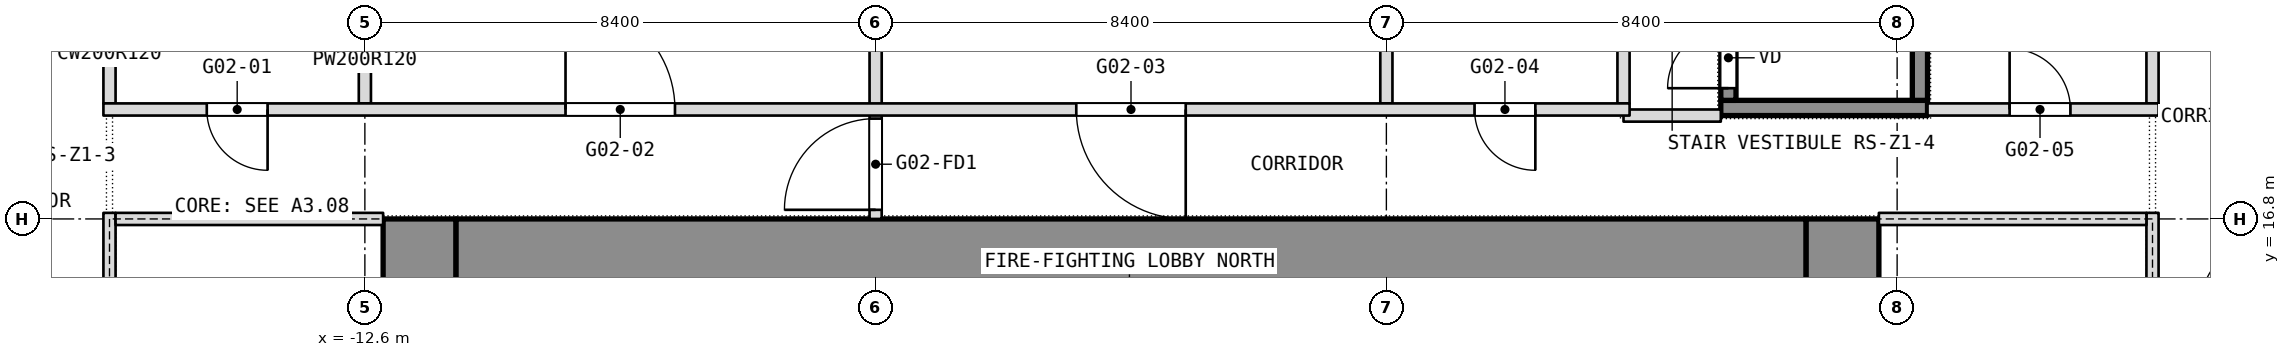
"""IFC4 building model, lengths in metres.
Left out: names, types, materials, properties, quantities, classifications, styles, units other than length and angle.
Written with IfcOpenShell. Run it as: python <this file> out.ifc"""

import sys

from ifc_helpers import new_model, si_unit, direction, frame, frame_2d, origin, place, context, subcontext, project, spatial, rectangle, extrude, element, fill, save


model = new_model("IFC4")
c1 = context("Model", 3, precision=1e-05, world=origin(), true_north=direction((0.0, 1.0)))
c2 = subcontext(c1, "Body", "Model", "MODEL_VIEW")
j1 = project(units=[si_unit("LENGTHUNIT", "METRE"), si_unit("PLANEANGLEUNIT", "RADIAN")], contexts=[c1])
p1 = place(None, origin())
s1 = spatial("IfcSite", under=j1, at=p1, CompositionType="ELEMENT")
p2 = place(p1, origin())
s2 = spatial("IfcBuilding", under=s1, at=p2, CompositionType="ELEMENT")
p3 = place(p2, frame((0.0, 0.0, 43.7)))
s3 = spatial("IfcBuildingStorey", under=s2, at=p3, CompositionType="ELEMENT", Elevation=43.7)
p4 = place(p3, frame((11.7, 0.0, 0.0), z_axis=(0.0, 0.0, 1.0), x_axis=(0.0, 1.0, 0.0)))
e1 = element("IfcWall", 1, at=p4, inside=s3, PredefinedType="SHEAR", context=c2, shape_type="SweptSolid", body=[
    extrude(rectangle(XDim=16.8, YDim=1.2, at=frame_2d((8.4, 0.0))), origin(), (0.0, 0.0, 1.0), 3.6),
])
p5 = place(p4, frame((1.837, 0.0, 0.0)))
e2 = element("IfcOpeningElement", 2, at=p5, cuts=e1, PredefinedType="OPENING", context=c2, shape_type="SweptSolid", body=[
    extrude(rectangle(XDim=0.9, YDim=2.1, at=frame_2d((0.45, 1.05))), frame((0.0, 0.6, 0.0), z_axis=(0.0, -1.0, 0.0), x_axis=(1.0, 0.0, 0.0)), (0.0, 0.0, 1.0), 1.2),
])
p6 = place(p4, frame((4.462, 0.0, 0.0)))
e3 = element("IfcOpeningElement", 3, at=p6, cuts=e1, PredefinedType="OPENING", context=c2, shape_type="SweptSolid", body=[
    extrude(rectangle(XDim=0.9, YDim=2.1, at=frame_2d((0.45, 1.05))), frame((0.0, 0.6, 0.0), z_axis=(0.0, -1.0, 0.0), x_axis=(1.0, 0.0, 0.0)), (0.0, 0.0, 1.0), 1.2),
])
p7 = place(p4, frame((6.825, 0.0, 0.0)))
e4 = element("IfcOpeningElement", 4, at=p7, cuts=e1, PredefinedType="OPENING", context=c2, shape_type="SweptSolid", body=[
    extrude(rectangle(XDim=1.2, YDim=2.1, at=frame_2d((0.6, 1.05))), frame((0.0, 0.6, 0.0), z_axis=(0.0, -1.0, 0.0), x_axis=(1.0, 0.0, 0.0)), (0.0, 0.0, 1.0), 1.2),
])
p8 = place(p4, frame((12.3, 0.0, 0.0)))
e5 = element("IfcOpeningElement", 5, at=p8, cuts=e1, PredefinedType="OPENING", context=c2, shape_type="SweptSolid", body=[
    extrude(rectangle(XDim=0.9, YDim=2.1, at=frame_2d((0.45, 1.05))), frame((0.0, 0.6, 0.0), z_axis=(0.0, -1.0, 0.0), x_axis=(1.0, 0.0, 0.0)), (0.0, 0.0, 1.0), 1.2),
])
p9 = place(p4, frame((8.775, 0.0, 0.0)))
e6 = element("IfcOpeningElement", 6, at=p9, cuts=e1, PredefinedType="OPENING", context=c2, shape_type="SweptSolid", body=[
    extrude(rectangle(XDim=1.2, YDim=2.1, at=frame_2d((0.6, 1.05))), frame((0.0, 0.6, 0.0), z_axis=(0.0, -1.0, 0.0), x_axis=(1.0, 0.0, 0.0)), (0.0, 0.0, 1.0), 1.2),
])
p10 = place(p3, frame((-11.7, 0.0, 0.0), z_axis=(0.0, 0.0, 1.0), x_axis=(0.0, 1.0, 0.0)))
e7 = element("IfcWall", 7, at=p10, inside=s3, PredefinedType="SHEAR", context=c2, shape_type="SweptSolid", body=[
    extrude(rectangle(XDim=16.8, YDim=1.2, at=frame_2d((8.4, 0.0))), origin(), (0.0, 0.0, 1.0), 3.6),
])
p11 = place(p10, frame((2.3, 0.0, 0.0)))
e8 = element("IfcOpeningElement", 8, at=p11, cuts=e7, PredefinedType="OPENING", context=c2, shape_type="SweptSolid", body=[
    extrude(rectangle(XDim=1.1, YDim=2.1, at=frame_2d((0.55, 1.05))), frame((0.0, 0.6, 0.0), z_axis=(0.0, -1.0, 0.0), x_axis=(1.0, 0.0, 0.0)), (0.0, 0.0, 1.0), 1.2),
])
p12 = place(p10, frame((4.85, 0.0, 0.0)))
e9 = element("IfcOpeningElement", 9, at=p12, cuts=e7, PredefinedType="OPENING", context=c2, shape_type="SweptSolid", body=[
    extrude(rectangle(XDim=1.1, YDim=2.1, at=frame_2d((0.55, 1.05))), frame((0.0, 0.6, 0.0), z_axis=(0.0, -1.0, 0.0), x_axis=(1.0, 0.0, 0.0)), (0.0, 0.0, 1.0), 1.2),
])
p13 = place(p10, frame((6.825, 0.0, 0.0)))
e10 = element("IfcOpeningElement", 10, at=p13, cuts=e7, PredefinedType="OPENING", context=c2, shape_type="SweptSolid", body=[
    extrude(rectangle(XDim=1.2, YDim=2.1, at=frame_2d((0.6, 1.05))), frame((0.0, 0.6, 0.0), z_axis=(0.0, -1.0, 0.0), x_axis=(1.0, 0.0, 0.0)), (0.0, 0.0, 1.0), 1.2),
])
p14 = place(p10, frame((13.4, 0.0, 0.0)))
e11 = element("IfcOpeningElement", 11, at=p14, cuts=e7, PredefinedType="OPENING", context=c2, shape_type="SweptSolid", body=[
    extrude(rectangle(XDim=1.1, YDim=2.1, at=frame_2d((0.55, 1.05))), frame((0.0, 0.6, 0.0), z_axis=(0.0, -1.0, 0.0), x_axis=(1.0, 0.0, 0.0)), (0.0, 0.0, 1.0), 1.2),
])
p15 = place(p10, frame((10.85, 0.0, 0.0)))
e12 = element("IfcOpeningElement", 12, at=p15, cuts=e7, PredefinedType="OPENING", context=c2, shape_type="SweptSolid", body=[
    extrude(rectangle(XDim=1.1, YDim=2.1, at=frame_2d((0.55, 1.05))), frame((0.0, 0.6, 0.0), z_axis=(0.0, -1.0, 0.0), x_axis=(1.0, 0.0, 0.0)), (0.0, 0.0, 1.0), 1.2),
])
p16 = place(p10, frame((8.775, 0.0, 0.0)))
e13 = element("IfcOpeningElement", 13, at=p16, cuts=e7, PredefinedType="OPENING", context=c2, shape_type="SweptSolid", body=[
    extrude(rectangle(XDim=1.2, YDim=2.1, at=frame_2d((0.6, 1.05))), frame((0.0, 0.6, 0.0), z_axis=(0.0, -1.0, 0.0), x_axis=(1.0, 0.0, 0.0)), (0.0, 0.0, 1.0), 1.2),
])
p17 = place(p3, frame((-11.1, 16.2, 0.0), z_axis=(0.0, 0.0, 1.0), x_axis=(1.0, 0.0, 0.0)))
e14 = element("IfcWall", 14, at=p17, inside=s3, PredefinedType="SHEAR", context=c2, shape_type="SweptSolid", body=[
    extrude(rectangle(XDim=22.2, YDim=1.2, at=frame_2d((11.1, 0.0))), origin(), (0.0, 0.0, 1.0), 3.6),
])
p18 = place(p3, frame((16.8, 18.7, 0.0), z_axis=(0.0, 0.0, 1.0), x_axis=(0.0, 1.0, 0.0)))
e15 = element("IfcWall", 15, at=p18, inside=s3, PredefinedType="PARTITIONING", context=c2, shape_type="SweptSolid", body=[
    extrude(rectangle(XDim=3.0, YDim=0.2, at=frame_2d((1.5, 0.0))), origin(), (0.0, 0.0, 1.0), 3.34),
])
for number, where, z_axis, x_axis in (
    (16, (8.1, 18.7, 0.0), (0.0, 0.0, 1.0), (0.0, 1.0, 0.0)),
    (17, (4.2, 18.7, 0.0), (0.0, 0.0, 1.0), (0.0, 1.0, 0.0)),
):
    element("IfcWall", number, at=place(p3, frame(where, z_axis=z_axis, x_axis=x_axis)), inside=s3, PredefinedType="PARTITIONING", context=c2, shape_type="SweptSolid", body=[
        extrude(rectangle(XDim=2.8, YDim=0.2, at=frame_2d((1.4, 0.0))), origin(), (0.0, 0.0, 1.0), 3.34),
    ])
p19 = place(p3, frame((-4.2, 16.8, 0.0), z_axis=(0.0, 0.0, 1.0), x_axis=(0.0, 1.0, 0.0)))
e18 = element("IfcWall", 18, at=p19, inside=s3, PredefinedType="PARTITIONING", context=c2, shape_type="SweptSolid", body=[
    extrude(rectangle(XDim=6.7, YDim=0.2, at=frame_2d((3.35, 0.0))), origin(), (0.0, 0.0, 1.0), 3.34),
])
p20 = place(p19, frame((0.15, 0.0, 0.0)))
e19 = element("IfcOpeningElement", 19, at=p20, cuts=e18, PredefinedType="OPENING", context=c2, shape_type="SweptSolid", body=[
    extrude(rectangle(XDim=1.5, YDim=2.1, at=frame_2d((0.75, 1.05))), frame((0.0, 0.1, 0.0), z_axis=(0.0, -1.0, 0.0), x_axis=(1.0, 0.0, 0.0)), (0.0, 0.0, 1.0), 0.2),
])
p21 = place(p19, frame((4.95, 0.0, 0.0)))
e20 = element("IfcOpeningElement", 20, at=p21, cuts=e18, PredefinedType="OPENING", context=c2, shape_type="SweptSolid", body=[
    extrude(rectangle(XDim=1.5, YDim=2.1, at=frame_2d((0.75, 1.05))), frame((0.0, 0.1, 0.0), z_axis=(0.0, -1.0, 0.0), x_axis=(1.0, 0.0, 0.0)), (0.0, 0.0, 1.0), 0.2),
])
p22 = place(p3, frame((-12.6, 18.7, 0.0), z_axis=(0.0, 0.0, 1.0), x_axis=(0.0, 1.0, 0.0)))
e21 = element("IfcWall", 21, at=p22, inside=s3, PredefinedType="PARTITIONING", context=c2, shape_type="SweptSolid", body=[
    extrude(rectangle(XDim=2.8, YDim=0.2, at=frame_2d((1.4, 0.0))), origin(), (0.0, 0.0, 1.0), 3.34),
])
p23 = place(p3, frame((-16.8, 18.7, 0.0), z_axis=(0.0, 0.0, 1.0), x_axis=(0.0, 1.0, 0.0)))
e22 = element("IfcWall", 22, at=p23, inside=s3, PredefinedType="PARTITIONING", context=c2, shape_type="SweptSolid", body=[
    extrude(rectangle(XDim=3.0, YDim=0.2, at=frame_2d((1.5, 0.0))), origin(), (0.0, 0.0, 1.0), 3.34),
])
p24 = place(p3, frame((8.1, 18.5, 0.0), z_axis=(0.0, 0.0, 1.0), x_axis=(1.0, 0.0, 0.0)))
e23 = element("IfcWall", 23, at=p24, inside=s3, PredefinedType="PARTITIONING", context=c2, shape_type="SweptSolid", body=[
    extrude(rectangle(XDim=1.6, YDim=0.2, at=frame_2d((0.8, 0.0))), origin(), (0.0, 0.0, 1.0), 3.34),
])
p25 = place(p3, frame((-16.9, 18.6, 0.0), z_axis=(0.0, 0.0, 1.0), x_axis=(1.0, 0.0, 0.0)))
e24 = element("IfcWall", 24, at=p25, inside=s3, PredefinedType="PARTITIONING", context=c2, shape_type="SweptSolid", body=[
    extrude(rectangle(XDim=25.1, YDim=0.2, at=frame_2d((12.55, 0.0))), origin(), (0.0, 0.0, 1.0), 3.34),
])
p26 = place(p25, frame((1.7, 0.0, 0.0)))
e25 = element("IfcOpeningElement", 25, at=p26, cuts=e24, PredefinedType="OPENING", context=c2, shape_type="SweptSolid", body=[
    extrude(rectangle(XDim=1.0, YDim=2.1, at=frame_2d((0.5, 1.05))), frame((0.0, 0.1, 0.0), z_axis=(0.0, -1.0, 0.0), x_axis=(1.0, 0.0, 0.0)), (0.0, 0.0, 1.0), 0.2),
])
p27 = place(p25, frame((7.6, 0.0, 0.0)))
e26 = element("IfcOpeningElement", 26, at=p27, cuts=e24, PredefinedType="OPENING", context=c2, shape_type="SweptSolid", body=[
    extrude(rectangle(XDim=1.8, YDim=2.1, at=frame_2d((0.9, 1.05))), frame((0.0, 0.1, 0.0), z_axis=(0.0, -1.0, 0.0), x_axis=(1.0, 0.0, 0.0)), (0.0, 0.0, 1.0), 0.2),
])
p28 = place(p25, frame((16.0, 0.0, 0.0)))
e27 = element("IfcOpeningElement", 27, at=p28, cuts=e24, PredefinedType="OPENING", context=c2, shape_type="SweptSolid", body=[
    extrude(rectangle(XDim=1.8, YDim=2.1, at=frame_2d((0.9, 1.05))), frame((0.0, 0.1, 0.0), z_axis=(0.0, -1.0, 0.0), x_axis=(1.0, 0.0, 0.0)), (0.0, 0.0, 1.0), 0.2),
])
p29 = place(p25, frame((22.55, 0.0, 0.0)))
e28 = element("IfcOpeningElement", 28, at=p29, cuts=e24, PredefinedType="OPENING", context=c2, shape_type="SweptSolid", body=[
    extrude(rectangle(XDim=1.0, YDim=2.1, at=frame_2d((0.5, 1.05))), frame((0.0, 0.1, 0.0), z_axis=(0.0, -1.0, 0.0), x_axis=(1.0, 0.0, 0.0)), (0.0, 0.0, 1.0), 0.2),
])
p30 = place(p3, frame((13.1, 18.6, 0.0), z_axis=(0.0, 0.0, 1.0), x_axis=(1.0, 0.0, 0.0)))
e29 = element("IfcWall", 29, at=p30, inside=s3, PredefinedType="PARTITIONING", context=c2, shape_type="SweptSolid", body=[
    extrude(rectangle(XDim=3.8, YDim=0.2, at=frame_2d((1.9, 0.0))), origin(), (0.0, 0.0, 1.0), 3.34),
])
p31 = place(p30, frame((1.35, 0.0, 0.0)))
e30 = element("IfcOpeningElement", 30, at=p31, cuts=e29, PredefinedType="OPENING", context=c2, shape_type="SweptSolid", body=[
    extrude(rectangle(XDim=1.0, YDim=2.1, at=frame_2d((0.5, 1.05))), frame((0.0, 0.1, 0.0), z_axis=(0.0, -1.0, 0.0), x_axis=(1.0, 0.0, 0.0)), (0.0, 0.0, 1.0), 0.2),
])
p32 = place(p3, frame((-16.8, -0.1, 0.0), z_axis=(0.0, 0.0, 1.0), x_axis=(0.0, 1.0, 0.0)))
e31 = element("IfcWall", 31, at=p32, inside=s3, PredefinedType="PARTITIONING", context=c2, shape_type="SweptSolid", body=[
    extrude(rectangle(XDim=17.0, YDim=0.2, at=frame_2d((8.5, 0.0))), origin(), (0.0, 0.0, 1.0), 3.34),
])
p33 = place(p32, frame((2.2, 0.0, 0.0)))
e32 = element("IfcOpeningElement", 32, at=p33, cuts=e31, PredefinedType="OPENING", context=c2, shape_type="SweptSolid", body=[
    extrude(rectangle(XDim=1.8, YDim=2.1, at=frame_2d((0.9, 1.05))), frame((0.0, 0.1, 0.0), z_axis=(0.0, -1.0, 0.0), x_axis=(1.0, 0.0, 0.0)), (0.0, 0.0, 1.0), 0.2),
])
p34 = place(p32, frame((7.2, 0.0, 0.0)))
e33 = element("IfcOpeningElement", 33, at=p34, cuts=e31, PredefinedType="OPENING", context=c2, shape_type="SweptSolid", body=[
    extrude(rectangle(XDim=1.8, YDim=2.1, at=frame_2d((0.9, 1.05))), frame((0.0, 0.1, 0.0), z_axis=(0.0, -1.0, 0.0), x_axis=(1.0, 0.0, 0.0)), (0.0, 0.0, 1.0), 0.2),
])
p35 = place(p3, frame((-16.7, 16.8, 0.0), z_axis=(0.0, 0.0, 1.0), x_axis=(1.0, 0.0, 0.0)))
e34 = element("IfcWall", 34, at=p35, inside=s3, PredefinedType="PARTITIONING", context=c2, shape_type="SweptSolid", body=[
    extrude(rectangle(XDim=4.4, YDim=0.2, at=frame_2d((2.2, 0.0))), origin(), (0.0, 0.0, 1.0), 2.84),
])
p36 = place(p3, frame((16.8, -0.1, 0.0), z_axis=(0.0, 0.0, 1.0), x_axis=(0.0, 1.0, 0.0)))
e35 = element("IfcWall", 35, at=p36, inside=s3, PredefinedType="PARTITIONING", context=c2, shape_type="SweptSolid", body=[
    extrude(rectangle(XDim=17.0, YDim=0.2, at=frame_2d((8.5, 0.0))), origin(), (0.0, 0.0, 1.0), 3.34),
])
p37 = place(p36, frame((2.2, 0.0, 0.0)))
e36 = element("IfcOpeningElement", 36, at=p37, cuts=e35, PredefinedType="OPENING", context=c2, shape_type="SweptSolid", body=[
    extrude(rectangle(XDim=1.8, YDim=2.1, at=frame_2d((0.9, 1.05))), frame((0.0, 0.1, 0.0), z_axis=(0.0, -1.0, 0.0), x_axis=(1.0, 0.0, 0.0)), (0.0, 0.0, 1.0), 0.2),
])
p38 = place(p36, frame((13.0, 0.0, 0.0)))
e37 = element("IfcOpeningElement", 37, at=p38, cuts=e35, PredefinedType="OPENING", context=c2, shape_type="SweptSolid", body=[
    extrude(rectangle(XDim=1.8, YDim=2.1, at=frame_2d((0.9, 1.05))), frame((0.0, 0.1, 0.0), z_axis=(0.0, -1.0, 0.0), x_axis=(1.0, 0.0, 0.0)), (0.0, 0.0, 1.0), 0.2),
])
p39 = place(p3, frame((12.3, 16.8, 0.0), z_axis=(0.0, 0.0, 1.0), x_axis=(1.0, 0.0, 0.0)))
e38 = element("IfcWall", 38, at=p39, inside=s3, PredefinedType="PARTITIONING", context=c2, shape_type="SweptSolid", body=[
    extrude(rectangle(XDim=4.4, YDim=0.2, at=frame_2d((2.2, 0.0))), origin(), (0.0, 0.0, 1.0), 2.84),
])
p40 = place(p3, frame((9.7, 18.625, 0.1), z_axis=(0.0, 0.0, 1.0), x_axis=(1.0, 0.0, 0.0)))
e39 = element("IfcWall", 39, at=p40, inside=s3, PredefinedType="SHEAR", context=c2, shape_type="SweptSolid", body=[
    extrude(rectangle(XDim=3.4, YDim=0.25, at=frame_2d((1.7, 0.0))), origin(), (0.0, 0.0, 1.0), 3.6),
])
p41 = place(p3, frame((9.825, 18.75, 0.1), z_axis=(0.0, 0.0, 1.0), x_axis=(0.0, 1.0, 0.0)))
e40 = element("IfcWall", 40, at=p41, inside=s3, PredefinedType="SHEAR", context=c2, shape_type="SweptSolid", body=[
    extrude(rectangle(XDim=5.7, YDim=0.25, at=frame_2d((2.85, 0.0))), origin(), (0.0, 0.0, 1.0), 3.6),
])
p42 = place(p41, frame((0.2, 0.0, 0.0)))
e41 = element("IfcOpeningElement", 41, at=p42, cuts=e40, PredefinedType="OPENING", context=c2, shape_type="SweptSolid", body=[
    extrude(rectangle(XDim=1.0, YDim=2.1, at=frame_2d((0.5, 1.05))), frame((0.0, 0.125, 0.0), z_axis=(0.0, -1.0, 0.0), x_axis=(1.0, 0.0, 0.0)), (0.0, 0.0, 1.0), 0.25),
])
p43 = place(p3, frame((12.975, 18.75, 0.1), z_axis=(0.0, 0.0, 1.0), x_axis=(0.0, 1.0, 0.0)))
e42 = element("IfcWall", 42, at=p43, inside=s3, PredefinedType="SHEAR", context=c2, shape_type="SweptSolid", body=[
    extrude(rectangle(XDim=5.7, YDim=0.25, at=frame_2d((2.85, 0.0))), origin(), (0.0, 0.0, 1.0), 3.6),
])
p44 = place(p26, origin())
e43 = element("IfcDoor", 43, at=p44, inside=s3, OperationType="SINGLE_SWING_RIGHT", PredefinedType="DOOR", context=c2, shape_type="SweptSolid", body=[
    extrude(rectangle(XDim=1.0, YDim=2.1, at=frame_2d((0.5, 1.05))), frame((0.0, 0.025, 0.0), z_axis=(0.0, -1.0, 0.0), x_axis=(1.0, 0.0, 0.0)), (0.0, 0.0, 1.0), 0.05),
])
fill(e25, e43)
p45 = place(p27, origin())
e44 = element("IfcDoor", 44, at=p45, inside=s3, OperationType="DOUBLE_DOOR_SINGLE_SWING", PredefinedType="DOOR", context=c2, shape_type="SweptSolid", body=[
    extrude(rectangle(XDim=1.8, YDim=2.1, at=frame_2d((0.9, 1.05))), frame((0.0, 0.025, 0.0), z_axis=(0.0, -1.0, 0.0), x_axis=(1.0, 0.0, 0.0)), (0.0, 0.0, 1.0), 0.05),
])
fill(e26, e44)
p46 = place(p28, origin())
e45 = element("IfcDoor", 45, at=p46, inside=s3, OperationType="DOUBLE_DOOR_SINGLE_SWING", PredefinedType="DOOR", context=c2, shape_type="SweptSolid", body=[
    extrude(rectangle(XDim=1.8, YDim=2.1, at=frame_2d((0.9, 1.05))), frame((0.0, 0.025, 0.0), z_axis=(0.0, -1.0, 0.0), x_axis=(1.0, 0.0, 0.0)), (0.0, 0.0, 1.0), 0.05),
])
fill(e27, e45)
p47 = place(p29, origin())
e46 = element("IfcDoor", 46, at=p47, inside=s3, OperationType="SINGLE_SWING_RIGHT", PredefinedType="DOOR", context=c2, shape_type="SweptSolid", body=[
    extrude(rectangle(XDim=1.0, YDim=2.1, at=frame_2d((0.5, 1.05))), frame((0.0, 0.025, 0.0), z_axis=(0.0, -1.0, 0.0), x_axis=(1.0, 0.0, 0.0)), (0.0, 0.0, 1.0), 0.05),
])
fill(e28, e46)
p48 = place(p31, origin())
e47 = element("IfcDoor", 47, at=p48, inside=s3, OperationType="SINGLE_SWING_LEFT", PredefinedType="DOOR", context=c2, shape_type="SweptSolid", body=[
    extrude(rectangle(XDim=1.0, YDim=2.1, at=frame_2d((0.5, 1.05))), frame((0.0, 0.025, 0.0), z_axis=(0.0, -1.0, 0.0), x_axis=(1.0, 0.0, 0.0)), (0.0, 0.0, 1.0), 0.05),
])
fill(e30, e47)
p49 = place(p42, origin())
e48 = element("IfcDoor", 48, at=p49, inside=s3, OperationType="SINGLE_SWING_LEFT", PredefinedType="DOOR", context=c2, shape_type="SweptSolid", body=[
    extrude(rectangle(XDim=1.0, YDim=2.1, at=frame_2d((0.5, 1.05))), frame((0.0, 0.025, 0.0), z_axis=(0.0, -1.0, 0.0), x_axis=(1.0, 0.0, 0.0)), (0.0, 0.0, 1.0), 0.05),
])
fill(e41, e48)
p50 = place(p20, origin())
e49 = element("IfcDoor", 49, at=p50, inside=s3, OperationType="DOUBLE_DOOR_DOUBLE_SWING", PredefinedType="DOOR", context=c2, shape_type="SweptSolid", body=[
    extrude(rectangle(XDim=1.5, YDim=2.1, at=frame_2d((0.75, 1.05))), frame((0.0, 0.025, 0.0), z_axis=(0.0, -1.0, 0.0), x_axis=(1.0, 0.0, 0.0)), (0.0, 0.0, 1.0), 0.05),
])
fill(e19, e49)
save(model, sys.argv[1])
